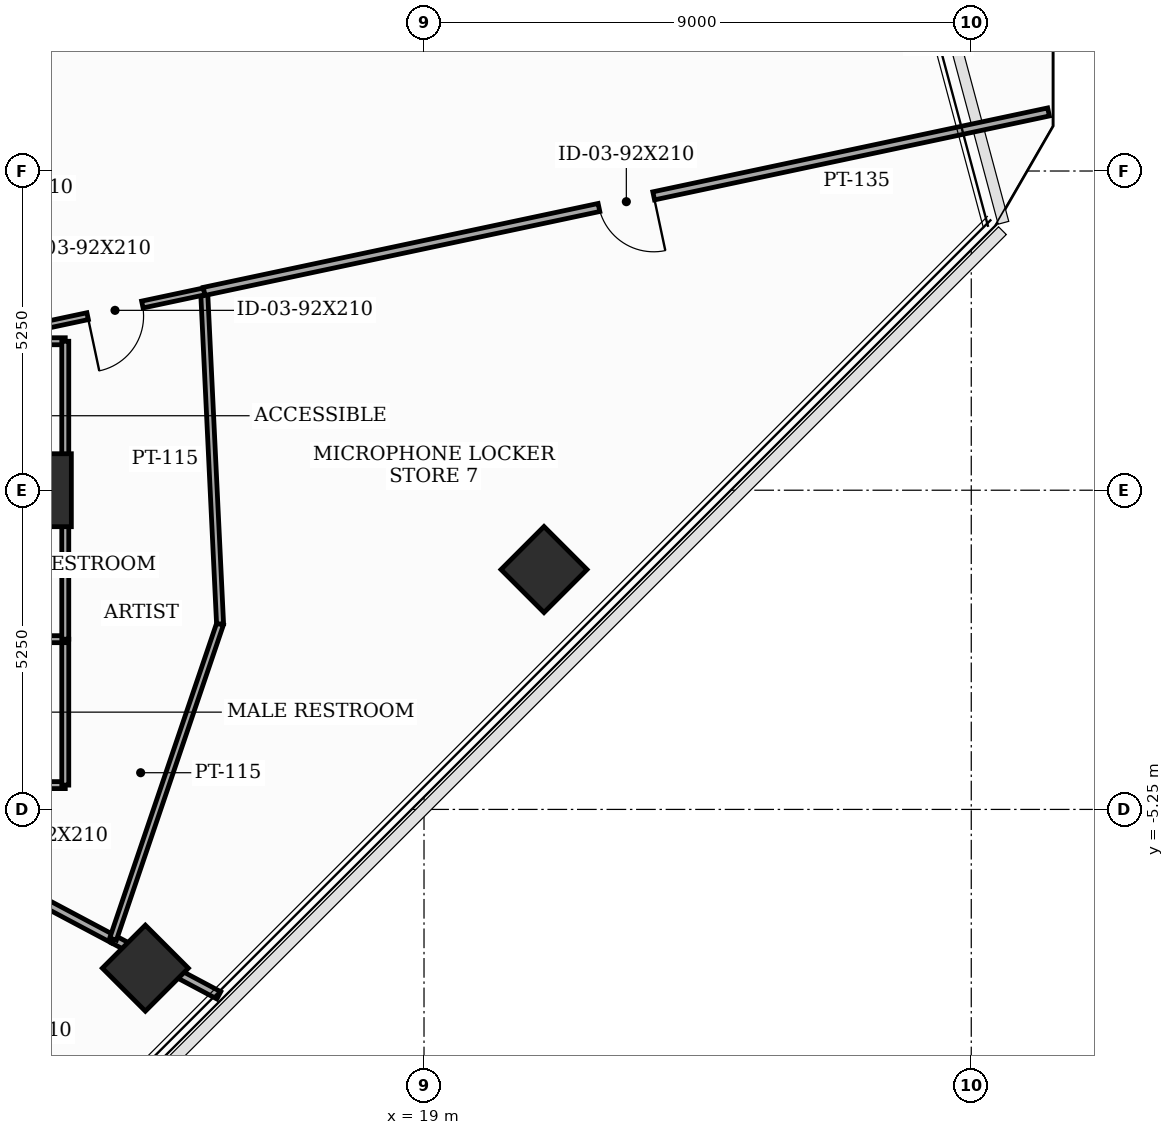
"""IFC4 building model, lengths in metres.
Left out: names, types, materials, properties, quantities, classifications, styles, units other than length and angle.
Written with IfcOpenShell. Run it as: python <this file> out.ifc"""

import sys

from ifc_helpers import new_model, si_unit, direction, frame, frame_2d, origin, origin_2d, place, context, subcontext, project, spatial, rectangle, extrude, element, fill, save


model = new_model("IFC4")
c1 = context("Model", 3, precision=1e-05, world=origin(), true_north=direction((0.0, 1.0)))
c2 = subcontext(c1, "Body", "Model", "MODEL_VIEW")
j1 = project(units=[si_unit("LENGTHUNIT", "METRE"), si_unit("PLANEANGLEUNIT", "RADIAN")], contexts=[c1])
p1 = place(None, origin())
s1 = spatial("IfcSite", under=j1, at=p1, CompositionType="ELEMENT")
p2 = place(p1, origin())
s2 = spatial("IfcBuilding", under=s1, at=p2, CompositionType="ELEMENT")
p3 = place(p2, frame((0.0, 0.0, 191.6)))
s3 = spatial("IfcBuildingStorey", under=s2, at=p3, CompositionType="ELEMENT", Elevation=191.6)
p4 = place(p3, frame((12.6, 0.0, 0.0), z_axis=(0.0, 0.0, 1.0), x_axis=(1.0, 0.0, 0.0)))
e1 = element("IfcColumn", 1, at=p4, inside=s3, PredefinedType="COLUMN", context=c2, shape_type="SweptSolid", body=[
    extrude(rectangle(XDim=1.2, YDim=1.2, at=origin_2d()), origin(), (0.0, 0.0, 1.0), 3.7),
])
for number, where, z_axis, x_axis in (
    (2, (14.417, -7.861, 0.0), (0.0, 0.0, 1.0), (0.707, 0.707, 0.0)),
    (3, (20.973, -1.305, 0.0), (0.0, 0.0, 1.0), (0.707, 0.707, 0.0)),
):
    element("IfcColumn", number, at=place(p3, frame(where, z_axis=z_axis, x_axis=x_axis)), inside=s3, PredefinedType="COLUMN", context=c2, shape_type="SweptSolid", body=[
        extrude(rectangle(XDim=1.0, YDim=1.0, at=origin_2d()), origin(), (0.0, 0.0, 1.0), 3.7),
    ])
p5 = place(p3, frame((13.886, -7.383, 0.0), z_axis=(0.0, 0.0, 1.0), x_axis=(-0.88302513666, 0.469325695041, 0.0)))
e4 = element("IfcWall", 4, at=p5, inside=s3, PredefinedType="PARTITIONING", context=c2, shape_type="SweptSolid", body=[
    extrude(rectangle(XDim=3.665, YDim=0.135, at=frame_2d((1.833, 0.0))), origin(), (0.0, 0.0, 1.0), 2.885),
])
p6 = place(p3, frame((15.625, -8.308, 0.0), z_axis=(0.0, 0.0, 1.0), x_axis=(-0.882966413063, 0.469436165418, 0.0)))
e5 = element("IfcWall", 5, at=p6, inside=s3, PredefinedType="PARTITIONING", context=c2, shape_type="SweptSolid", body=[
    extrude(rectangle(XDim=1.969, YDim=0.135, at=frame_2d((0.985, 0.0))), origin(), (0.0, 0.0, 1.0), 2.985),
])
p7 = place(p3, frame((10.65, -4.85, 0.0), z_axis=(0.0, 0.0, 1.0), x_axis=(1.0, 0.0, 0.0)))
e6 = element("IfcWall", 6, at=p7, inside=s3, PredefinedType="PARTITIONING", context=c2, shape_type="SweptSolid", body=[
    extrude(rectangle(XDim=2.45, YDim=0.115, at=frame_2d((1.225, 0.0))), origin(), (0.0, 0.0, 1.0), 2.885),
])
p8 = place(p3, frame((13.1, -4.85, 0.0), z_axis=(0.0, 0.0, 1.0), x_axis=(0.0, 1.0, 0.0)))
e7 = element("IfcWall", 7, at=p8, inside=s3, PredefinedType="PARTITIONING", context=c2, shape_type="SweptSolid", body=[
    extrude(rectangle(XDim=2.4, YDim=0.115, at=frame_2d((1.2, 0.0))), origin(), (0.0, 0.0, 1.0), 3.5),
])
p9 = place(p3, frame((13.1, -2.45, 0.0), z_axis=(0.0, 0.0, 1.0), x_axis=(-1.0, 0.0, 0.0)))
e8 = element("IfcWall", 8, at=p9, inside=s3, PredefinedType="PARTITIONING", context=c2, shape_type="SweptSolid", body=[
    extrude(rectangle(XDim=2.45, YDim=0.115, at=frame_2d((1.225, 0.0))), origin(), (0.0, 0.0, 1.0), 2.885),
])
p10 = place(p3, frame((13.1, 0.0, 0.0), z_axis=(0.0, 0.0, 1.0), x_axis=(0.0, -1.0, 0.0)))
e9 = element("IfcWall", 9, at=p10, inside=s3, PredefinedType="PARTITIONING", context=c2, shape_type="SweptSolid", body=[
    extrude(rectangle(XDim=2.45, YDim=0.115, at=frame_2d((1.225, 0.0))), origin(), (0.0, 0.0, 1.0), 2.985),
])
p11 = place(p3, frame((13.886, -7.383, 0.0), z_axis=(0.0, 0.0, 1.0), x_axis=(0.321480582018, 0.946916171255, 0.0)))
e10 = element("IfcWall", 10, at=p11, inside=s3, PredefinedType="PARTITIONING", context=c2, shape_type="SweptSolid", body=[
    extrude(rectangle(XDim=5.475, YDim=0.115, at=frame_2d((2.737, 0.0))), origin(), (0.0, 0.0, 1.0), 3.5),
])
p12 = place(p3, frame((15.646, -2.199, 0.0), z_axis=(0.0, 0.0, 1.0), x_axis=(-0.047844791808, 0.998854782187, 0.0)))
e11 = element("IfcWall", 11, at=p12, inside=s3, PredefinedType="PARTITIONING", context=c2, shape_type="SweptSolid", body=[
    extrude(rectangle(XDim=5.475, YDim=0.115, at=frame_2d((2.738, 0.0))), origin(), (0.0, 0.0, 1.0), 2.985),
])
p13 = place(p3, frame((12.007, 2.45, 0.0), z_axis=(0.0, 0.0, 1.0), x_axis=(1.0, 0.0, 0.0)))
e12 = element("IfcWall", 12, at=p13, inside=s3, PredefinedType="PARTITIONING", context=c2, shape_type="SweptSolid", body=[
    extrude(rectangle(XDim=1.093, YDim=0.115, at=frame_2d((0.546, 0.0))), origin(), (0.0, 0.0, 1.0), 2.885),
])
p14 = place(p3, frame((13.1, 2.45, 0.0), z_axis=(0.0, 0.0, 1.0), x_axis=(0.0, -1.0, 0.0)))
e13 = element("IfcWall", 13, at=p14, inside=s3, PredefinedType="PARTITIONING", context=c2, shape_type="SweptSolid", body=[
    extrude(rectangle(XDim=2.45, YDim=0.115, at=frame_2d((1.225, 0.0))), origin(), (0.0, 0.0, 1.0), 2.985),
])
p15 = place(p3, frame((15.384, 3.27, 0.0), z_axis=(0.0, 0.0, 1.0), x_axis=(-0.978147995284, -0.207909834598, 0.0)))
e14 = element("IfcWall", 14, at=p15, inside=s3, PredefinedType="PARTITIONING", context=c2, shape_type="SweptSolid", body=[
    extrude(rectangle(XDim=3.944, YDim=0.115, at=frame_2d((1.972, 0.0))), origin(), (0.0, 0.0, 1.0), 2.885),
])
p16 = place(p15, frame((1.039, 0.0, 0.0)))
e15 = element("IfcOpeningElement", 15, at=p16, cuts=e14, PredefinedType="OPENING", context=c2, shape_type="SweptSolid", body=[
    extrude(rectangle(XDim=0.92, YDim=2.1, at=frame_2d((0.46, 1.05))), frame((0.0, 0.067, 0.0), z_axis=(0.0, -1.0, 0.0), x_axis=(1.0, 0.0, 0.0)), (0.0, 0.0, 1.0), 0.135),
])
p17 = place(p3, frame((13.1, 0.0, 0.0), z_axis=(0.0, 0.0, 1.0), x_axis=(-1.0, 0.0, 0.0)))
e16 = element("IfcWall", 16, at=p17, inside=s3, PredefinedType="PARTITIONING", context=c2, shape_type="SweptSolid", body=[
    extrude(rectangle(XDim=2.45, YDim=0.115, at=frame_2d((1.225, 0.0))), origin(), (0.0, 0.0, 1.0), 2.885),
])
p18 = place(p3, frame((29.271, 6.221, 0.0), z_axis=(0.0, 0.0, 1.0), x_axis=(-0.978151114267, -0.207895160259, 0.0)))
e17 = element("IfcWall", 17, at=p18, inside=s3, PredefinedType="PARTITIONING", context=c2, shape_type="SweptSolid", body=[
    extrude(rectangle(XDim=14.197, YDim=0.135, at=frame_2d((7.098, 0.0))), origin(), (0.0, 0.0, 1.0), 2.985),
])
p19 = place(p18, frame((6.638, 0.0, 0.0)))
e18 = element("IfcOpeningElement", 18, at=p19, cuts=e17, PredefinedType="OPENING", context=c2, shape_type="SweptSolid", body=[
    extrude(rectangle(XDim=0.92, YDim=2.1, at=frame_2d((0.46, 1.05))), frame((0.0, 0.077, 0.0), z_axis=(0.0, -1.0, 0.0), x_axis=(1.0, 0.0, 0.0)), (0.0, 0.0, 1.0), 0.155),
])
p20 = place(p16, origin())
e19 = element("IfcDoor", 19, at=p20, inside=s3, OperationType="SINGLE_SWING_RIGHT", PredefinedType="DOOR", context=c2, shape_type="SweptSolid", body=[
    extrude(rectangle(XDim=0.92, YDim=2.1, at=frame_2d((0.46, 1.05))), frame((0.0, 0.025, 0.0), z_axis=(0.0, -1.0, 0.0), x_axis=(1.0, 0.0, 0.0)), (0.0, 0.0, 1.0), 0.05),
])
fill(e15, e19)
p21 = place(p19, origin())
e20 = element("IfcDoor", 20, at=p21, inside=s3, OperationType="SINGLE_SWING_LEFT", PredefinedType="DOOR", context=c2, shape_type="SweptSolid", body=[
    extrude(rectangle(XDim=0.92, YDim=2.1, at=frame_2d((0.46, 1.05))), frame((0.0, 0.025, 0.0), z_axis=(0.0, -1.0, 0.0), x_axis=(1.0, 0.0, 0.0)), (0.0, 0.0, 1.0), 0.05),
])
fill(e18, e20)
save(model, sys.argv[1])
